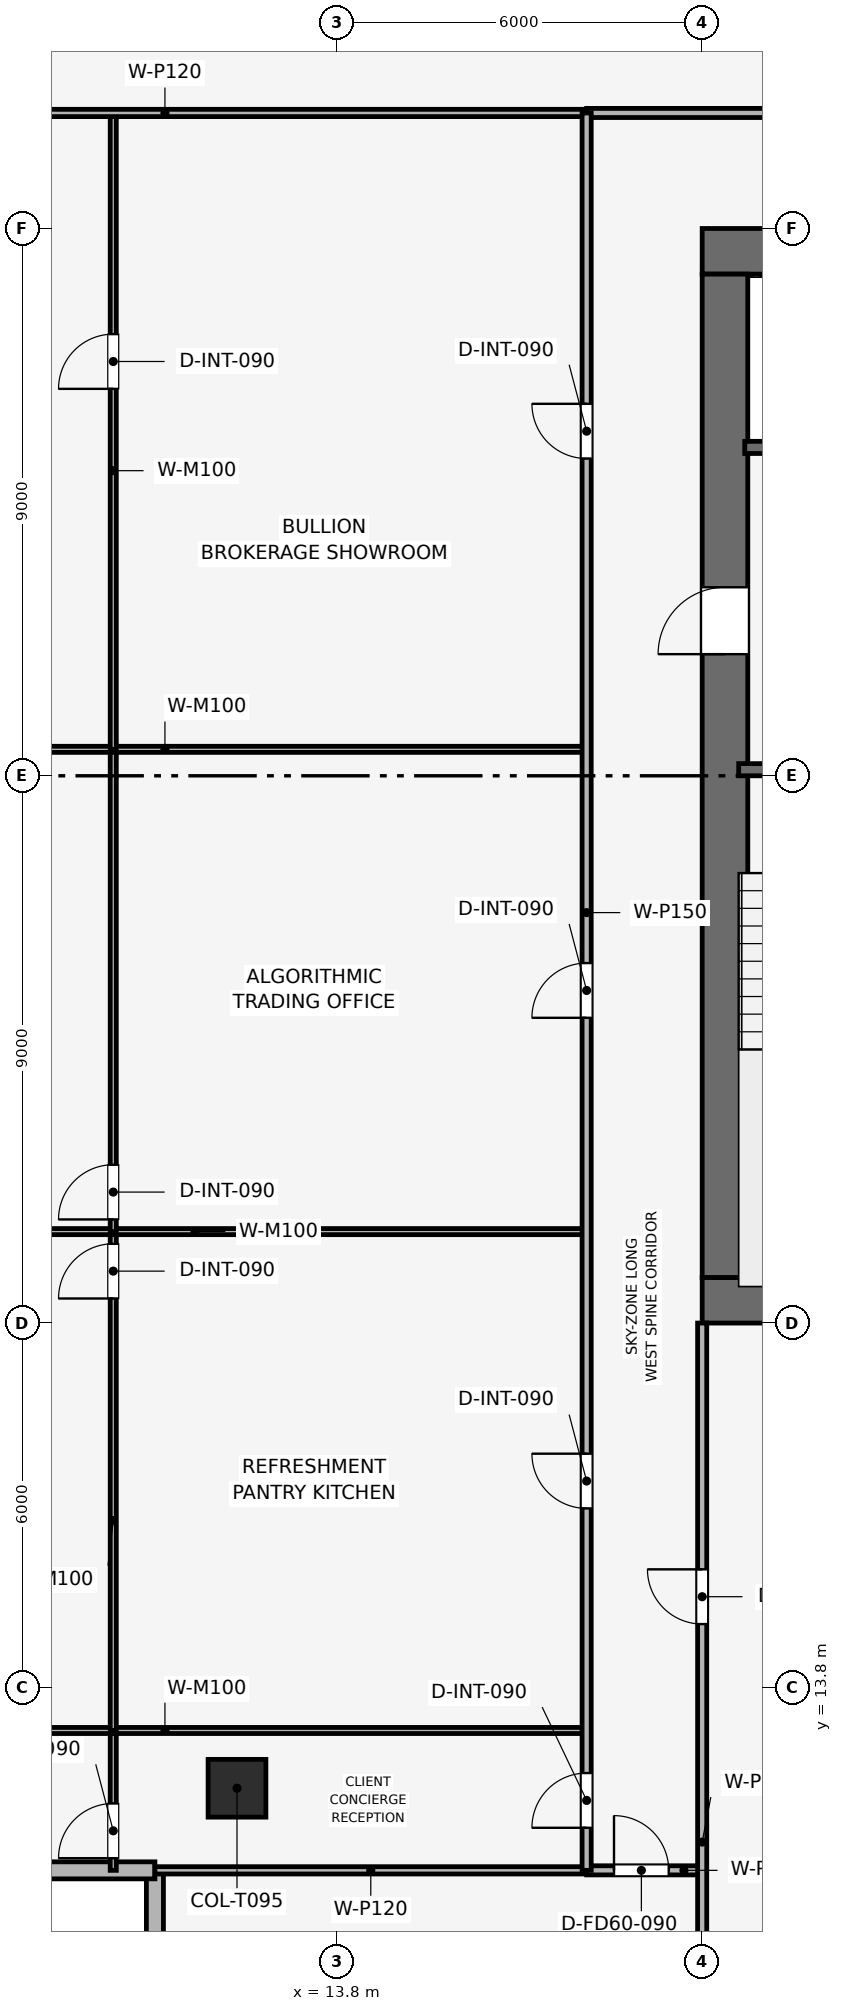
"""IFC4 building model, lengths in metres.
Left out: names, types, materials, properties, quantities, classifications, styles, units other than length and angle.
Written with IfcOpenShell. Run it as: python <this file> out.ifc"""

import sys

from ifc_helpers import new_model, si_unit, direction, frame, frame_2d, origin, origin_2d, place, context, subcontext, project, spatial, rectangle, extrude, element, fill, save


model = new_model("IFC4")
c1 = context("Model", 3, precision=1e-05, world=origin(), true_north=direction((0.0, 1.0)))
c2 = subcontext(c1, "Body", "Model", "MODEL_VIEW")
j1 = project(units=[si_unit("LENGTHUNIT", "METRE"), si_unit("PLANEANGLEUNIT", "RADIAN")], contexts=[c1])
p1 = place(None, origin())
s1 = spatial("IfcSite", under=j1, at=p1, CompositionType="ELEMENT")
p2 = place(p1, origin())
s2 = spatial("IfcBuilding", under=s1, at=p2, CompositionType="ELEMENT")
p3 = place(p2, frame((0.0, 0.0, 272.85)))
s3 = spatial("IfcBuildingStorey", under=s2, at=p3, CompositionType="ELEMENT", Elevation=272.85)
p4 = place(p3, frame((19.8, 20.175, 0.0), z_axis=(0.0, 0.0, 1.0), x_axis=(1.0, 0.0, 0.0)))
e1 = element("IfcWall", 1, at=p4, inside=s3, PredefinedType="SHEAR", context=c2, shape_type="SweptSolid", body=[
    extrude(rectangle(XDim=18.0, YDim=0.75, at=frame_2d((9.0, 0.0))), origin(), (0.0, 0.0, 1.0), 3.75),
])
p5 = place(p3, frame((19.8, 37.425, 0.0), z_axis=(0.0, 0.0, 1.0), x_axis=(1.0, 0.0, 0.0)))
e2 = element("IfcWall", 2, at=p5, inside=s3, PredefinedType="SHEAR", context=c2, shape_type="SweptSolid", body=[
    extrude(rectangle(XDim=18.0, YDim=0.75, at=frame_2d((9.0, 0.0))), origin(), (0.0, 0.0, 1.0), 3.75),
])
p6 = place(p5, frame((7.05, 0.0, 0.0)))
e3 = element("IfcOpeningElement", 3, at=p6, cuts=e2, PredefinedType="OPENING", context=c2, shape_type="SweptSolid", body=[
    extrude(rectangle(XDim=1.1, YDim=2.15, at=frame_2d((0.55, 1.075))), frame((0.0, 0.385, 0.0), z_axis=(0.0, -1.0, 0.0), x_axis=(1.0, 0.0, 0.0)), (0.0, 0.0, 1.0), 0.77),
])
p7 = place(p3, frame((20.175, 20.55, 0.0), z_axis=(0.0, 0.0, 1.0), x_axis=(0.0, 1.0, 0.0)))
e4 = element("IfcWall", 4, at=p7, inside=s3, PredefinedType="SHEAR", context=c2, shape_type="SweptSolid", body=[
    extrude(rectangle(XDim=16.5, YDim=0.75, at=frame_2d((8.25, 0.0))), origin(), (0.0, 0.0, 1.0), 3.75),
])
p8 = place(p7, frame((10.25, 0.0, 0.0)))
e5 = element("IfcOpeningElement", 5, at=p8, cuts=e4, PredefinedType="OPENING", context=c2, shape_type="SweptSolid", body=[
    extrude(rectangle(XDim=1.1, YDim=2.15, at=frame_2d((0.55, 1.075))), frame((0.0, 0.385, 0.0), z_axis=(0.0, -1.0, 0.0), x_axis=(1.0, 0.0, 0.0)), (0.0, 0.0, 1.0), 0.77),
])
p9 = place(p3, frame((12.15, 12.15, 0.003), z_axis=(0.0, 0.0, 1.0), x_axis=(1.0, 0.0, 0.0)))
e6 = element("IfcColumn", 6, at=p9, inside=s3, PredefinedType="COLUMN", context=c2, shape_type="SweptSolid", body=[
    extrude(rectangle(XDim=0.95, YDim=0.95, at=origin_2d()), origin(), (0.0, 0.0, 1.0), 3.494),
])
p10 = place(p3, frame((10.8, 4.03, 0.0), z_axis=(0.0, 0.0, 1.0), x_axis=(0.0, 1.0, 0.0)))
e7 = element("IfcWall", 7, at=p10, inside=s3, PredefinedType="SOLIDWALL", context=c2, shape_type="SweptSolid", body=[
    extrude(rectangle(XDim=6.77, YDim=0.28, at=frame_2d((3.385, 0.0))), origin(), (0.0, 0.0, 1.0), 3.5),
])
p11 = place(p10, frame((2.135, 0.0, 0.9)))
e8 = element("IfcOpeningElement", 8, at=p11, cuts=e7, PredefinedType="OPENING", context=c2, shape_type="SweptSolid", body=[
    extrude(rectangle(XDim=2.5, YDim=1.9, at=frame_2d((1.25, 0.95))), frame((0.0, 0.15, 0.0), z_axis=(0.0, -1.0, 0.0), x_axis=(1.0, 0.0, 0.0)), (0.0, 0.0, 1.0), 0.3),
])
p12 = place(p3, frame((10.8, 10.8, 0.0), z_axis=(0.0, 0.0, 1.0), x_axis=(-1.0, 0.0, 0.0)))
e9 = element("IfcWall", 9, at=p12, inside=s3, PredefinedType="SOLIDWALL", context=c2, shape_type="SweptSolid", body=[
    extrude(rectangle(XDim=6.77, YDim=0.28, at=frame_2d((3.385, 0.0))), origin(), (0.0, 0.0, 1.0), 3.5),
])
p13 = place(p12, frame((2.135, 0.0, 0.9)))
e10 = element("IfcOpeningElement", 10, at=p13, cuts=e9, PredefinedType="OPENING", context=c2, shape_type="SweptSolid", body=[
    extrude(rectangle(XDim=2.5, YDim=1.9, at=frame_2d((1.25, 0.95))), frame((0.0, 0.15, 0.0), z_axis=(0.0, -1.0, 0.0), x_axis=(1.0, 0.0, 0.0)), (0.0, 0.0, 1.0), 0.3),
])
p14 = place(p3, frame((20.4, 28.9, 0.0), z_axis=(0.0, 0.0, 1.0), x_axis=(1.0, 0.0, 0.0)))
e11 = element("IfcWall", 11, at=p14, inside=s3, PredefinedType="SHEAR", context=c2, shape_type="SweptSolid", body=[
    extrude(rectangle(XDim=3.15, YDim=0.2, at=frame_2d((1.575, 0.0))), origin(), (0.0, 0.0, 1.0), 3.5),
])
p15 = place(p14, frame((0.8, 0.0, 0.0)))
e12 = element("IfcOpeningElement", 12, at=p15, cuts=e11, PredefinedType="OPENING", context=c2, shape_type="SweptSolid", body=[
    extrude(rectangle(XDim=1.0, YDim=2.1, at=frame_2d((0.5, 1.05))), frame((0.0, 0.11, 0.0), z_axis=(0.0, -1.0, 0.0), x_axis=(1.0, 0.0, 0.0)), (0.0, 0.0, 1.0), 0.22),
])
p16 = place(p3, frame((20.5, 34.2, 0.0), z_axis=(0.0, 0.0, 1.0), x_axis=(1.0, 0.0, 0.0)))
e13 = element("IfcWall", 13, at=p16, inside=s3, PredefinedType="SHEAR", context=c2, shape_type="SweptSolid", body=[
    extrude(rectangle(XDim=3.05, YDim=0.2, at=frame_2d((1.525, 0.0))), origin(), (0.0, 0.0, 1.0), 3.5),
])
p17 = place(p16, frame((0.75, 0.0, 0.0)))
e14 = element("IfcOpeningElement", 14, at=p17, cuts=e13, PredefinedType="OPENING", context=c2, shape_type="SweptSolid", body=[
    extrude(rectangle(XDim=1.1, YDim=2.15, at=frame_2d((0.55, 1.075))), frame((0.0, 0.11, 0.0), z_axis=(0.0, -1.0, 0.0), x_axis=(1.0, 0.0, 0.0)), (0.0, 0.0, 1.0), 0.22),
])
p18 = place(p3, frame((10.115, 10.8, 0.0), z_axis=(0.0, 0.0, 1.0), x_axis=(0.0, 1.0, 0.0)))
e15 = element("IfcWall", 15, at=p18, inside=s3, PredefinedType="MOVABLE", context=c2, shape_type="SweptSolid", body=[
    extrude(rectangle(XDim=2.3, YDim=0.1, at=frame_2d((1.15, 0.0))), origin(), (0.0, 0.0, 1.0), 3.085),
])
p19 = place(p18, frame((0.2, 0.0, 0.0)))
e16 = element("IfcOpeningElement", 16, at=p19, cuts=e15, PredefinedType="OPENING", context=c2, shape_type="SweptSolid", body=[
    extrude(rectangle(XDim=0.9, YDim=2.1, at=frame_2d((0.45, 1.05))), frame((0.0, 0.06, 0.0), z_axis=(0.0, -1.0, 0.0), x_axis=(1.0, 0.0, 0.0)), (0.0, 0.0, 1.0), 0.12),
])
p20 = place(p3, frame((4.03, 13.1, 0.0), z_axis=(0.0, 0.0, 1.0), x_axis=(1.0, 0.0, 0.0)))
e17 = element("IfcWall", 17, at=p20, inside=s3, PredefinedType="MOVABLE", context=c2, shape_type="SweptSolid", body=[
    extrude(rectangle(XDim=13.87, YDim=0.1, at=frame_2d((6.935, 0.0))), origin(), (0.0, 0.0, 1.0), 3.085),
])
p21 = place(p3, frame((10.115, 13.1, 0.0), z_axis=(0.0, 0.0, 1.0), x_axis=(0.0, 1.0, 0.0)))
e18 = element("IfcWall", 18, at=p21, inside=s3, PredefinedType="MOVABLE", context=c2, shape_type="SweptSolid", body=[
    extrude(rectangle(XDim=8.204, YDim=0.1, at=frame_2d((4.102, 0.0))), origin(), (0.0, 0.0, 1.0), 3.085),
])
p22 = place(p21, frame((7.104, 0.0, 0.0)))
e19 = element("IfcOpeningElement", 19, at=p22, cuts=e18, PredefinedType="OPENING", context=c2, shape_type="SweptSolid", body=[
    extrude(rectangle(XDim=0.9, YDim=2.1, at=frame_2d((0.45, 1.05))), frame((0.0, 0.06, 0.0), z_axis=(0.0, -1.0, 0.0), x_axis=(1.0, 0.0, 0.0)), (0.0, 0.0, 1.0), 0.12),
])
p23 = place(p3, frame((4.03, 21.304, 0.0), z_axis=(0.0, 0.0, 1.0), x_axis=(1.0, 0.0, 0.0)))
e20 = element("IfcWall", 20, at=p23, inside=s3, PredefinedType="MOVABLE", context=c2, shape_type="SweptSolid", body=[
    extrude(rectangle(XDim=13.87, YDim=0.1, at=frame_2d((6.935, 0.0))), origin(), (0.0, 0.0, 1.0), 3.085),
])
p24 = place(p3, frame((10.115, 21.304, 0.0), z_axis=(0.0, 0.0, 1.0), x_axis=(0.0, 1.0, 0.0)))
e21 = element("IfcWall", 21, at=p24, inside=s3, PredefinedType="MOVABLE", context=c2, shape_type="SweptSolid", body=[
    extrude(rectangle(XDim=7.931, YDim=0.1, at=frame_2d((3.966, 0.0))), origin(), (0.0, 0.0, 1.0), 3.085),
])
p25 = place(p24, frame((0.2, 0.0, 0.0)))
e22 = element("IfcOpeningElement", 22, at=p25, cuts=e21, PredefinedType="OPENING", context=c2, shape_type="SweptSolid", body=[
    extrude(rectangle(XDim=0.9, YDim=2.1, at=frame_2d((0.45, 1.05))), frame((0.0, 0.06, 0.0), z_axis=(0.0, -1.0, 0.0), x_axis=(1.0, 0.0, 0.0)), (0.0, 0.0, 1.0), 0.12),
])
p26 = place(p3, frame((4.03, 29.235, 0.0), z_axis=(0.0, 0.0, 1.0), x_axis=(1.0, 0.0, 0.0)))
e23 = element("IfcWall", 23, at=p26, inside=s3, PredefinedType="MOVABLE", context=c2, shape_type="SweptSolid", body=[
    extrude(rectangle(XDim=13.87, YDim=0.1, at=frame_2d((6.935, 0.0))), origin(), (0.0, 0.0, 1.0), 3.085),
])
p27 = place(p3, frame((10.115, 29.235, 0.0), z_axis=(0.0, 0.0, 1.0), x_axis=(0.0, 1.0, 0.0)))
e24 = element("IfcWall", 24, at=p27, inside=s3, PredefinedType="MOVABLE", context=c2, shape_type="SweptSolid", body=[
    extrude(rectangle(XDim=10.465, YDim=0.1, at=frame_2d((5.232, 0.0))), origin(), (0.0, 0.0, 1.0), 3.085),
])
p28 = place(p27, frame((5.928, 0.0, 0.0)))
e25 = element("IfcOpeningElement", 25, at=p28, cuts=e24, PredefinedType="OPENING", context=c2, shape_type="SweptSolid", body=[
    extrude(rectangle(XDim=0.9, YDim=2.1, at=frame_2d((0.45, 1.05))), frame((0.0, 0.06, 0.0), z_axis=(0.0, -1.0, 0.0), x_axis=(1.0, 0.0, 0.0)), (0.0, 0.0, 1.0), 0.12),
])
p29 = place(p3, frame((10.8, 10.8, 0.0), z_axis=(0.0, 0.0, 1.0), x_axis=(1.0, 0.0, 0.0)))
e26 = element("IfcWall", 26, at=p29, inside=s3, PredefinedType="PARTITIONING", context=c2, shape_type="SweptSolid", body=[
    extrude(rectangle(XDim=7.1, YDim=0.12, at=frame_2d((3.55, 0.0))), origin(), (0.0, 0.0, 1.0), 3.085),
])
p30 = place(p3, frame((17.9, 10.8, 0.0), z_axis=(0.0, 0.0, 1.0), x_axis=(1.0, 0.0, 0.0)))
e27 = element("IfcWall", 27, at=p30, inside=s3, PredefinedType="PARTITIONING", context=c2, shape_type="SweptSolid", body=[
    extrude(rectangle(XDim=1.9, YDim=0.15, at=frame_2d((0.95, 0.0))), origin(), (0.0, 0.0, 1.0), 3.5),
])
p31 = place(p30, frame((0.45, 0.0, 0.0)))
e28 = element("IfcOpeningElement", 28, at=p31, cuts=e27, PredefinedType="OPENING", context=c2, shape_type="SweptSolid", body=[
    extrude(rectangle(XDim=0.9, YDim=2.1, at=frame_2d((0.45, 1.05))), frame((0.0, 0.085, 0.0), z_axis=(0.0, -1.0, 0.0), x_axis=(1.0, 0.0, 0.0)), (0.0, 0.0, 1.0), 0.17),
])
p32 = place(p3, frame((19.8, 4.03, 0.0), z_axis=(0.0, 0.0, 1.0), x_axis=(0.0, 1.0, 0.0)))
e29 = element("IfcWall", 29, at=p32, inside=s3, PredefinedType="PARTITIONING", context=c2, shape_type="SweptSolid", body=[
    extrude(rectangle(XDim=15.77, YDim=0.15, at=frame_2d((7.885, 0.0))), origin(), (0.0, 0.0, 1.0), 3.085),
])
p33 = place(p32, frame((10.82, 0.0, 0.0)))
e30 = element("IfcOpeningElement", 30, at=p33, cuts=e29, PredefinedType="OPENING", context=c2, shape_type="SweptSolid", body=[
    extrude(rectangle(XDim=0.9, YDim=2.1, at=frame_2d((0.45, 1.05))), frame((0.0, 0.085, 0.0), z_axis=(0.0, -1.0, 0.0), x_axis=(1.0, 0.0, 0.0)), (0.0, 0.0, 1.0), 0.17),
])
p34 = place(p3, frame((4.03, 39.7, 0.0), z_axis=(0.0, 0.0, 1.0), x_axis=(1.0, 0.0, 0.0)))
e31 = element("IfcWall", 31, at=p34, inside=s3, PredefinedType="PARTITIONING", context=c2, shape_type="SweptSolid", body=[
    extrude(rectangle(XDim=13.87, YDim=0.12, at=frame_2d((6.935, 0.0))), origin(), (0.0, 0.0, 1.0), 3.085),
])
p35 = place(p3, frame((17.9, 39.7, 0.0), z_axis=(0.0, 0.0, 1.0), x_axis=(1.0, 0.0, 0.0)))
e32 = element("IfcWall", 32, at=p35, inside=s3, PredefinedType="PARTITIONING", context=c2, shape_type="SweptSolid", body=[
    extrude(rectangle(XDim=21.8, YDim=0.15, at=frame_2d((10.9, 0.0))), origin(), (0.0, 0.0, 1.0), 3.085),
])
p36 = place(p35, frame((3.3, 0.0, 0.0)))
e33 = element("IfcOpeningElement", 33, at=p36, cuts=e32, PredefinedType="OPENING", context=c2, shape_type="SweptSolid", body=[
    extrude(rectangle(XDim=0.9, YDim=2.1, at=frame_2d((0.45, 1.05))), frame((0.0, 0.085, 0.0), z_axis=(0.0, -1.0, 0.0), x_axis=(1.0, 0.0, 0.0)), (0.0, 0.0, 1.0), 0.17),
])
p37 = place(p35, frame((8.45, 0.0, 0.0)))
e34 = element("IfcOpeningElement", 34, at=p37, cuts=e32, PredefinedType="OPENING", context=c2, shape_type="SweptSolid", body=[
    extrude(rectangle(XDim=0.9, YDim=2.1, at=frame_2d((0.45, 1.05))), frame((0.0, 0.085, 0.0), z_axis=(0.0, -1.0, 0.0), x_axis=(1.0, 0.0, 0.0)), (0.0, 0.0, 1.0), 0.17),
])
p38 = place(p35, frame((11.35, 0.0, 0.0)))
e35 = element("IfcOpeningElement", 35, at=p38, cuts=e32, PredefinedType="OPENING", context=c2, shape_type="SweptSolid", body=[
    extrude(rectangle(XDim=0.9, YDim=2.1, at=frame_2d((0.45, 1.05))), frame((0.0, 0.085, 0.0), z_axis=(0.0, -1.0, 0.0), x_axis=(1.0, 0.0, 0.0)), (0.0, 0.0, 1.0), 0.17),
])
p39 = place(p35, frame((14.1, 0.0, 0.0)))
e36 = element("IfcOpeningElement", 36, at=p39, cuts=e32, PredefinedType="OPENING", context=c2, shape_type="SweptSolid", body=[
    extrude(rectangle(XDim=0.95, YDim=2.1, at=frame_2d((0.475, 1.05))), frame((0.0, 0.085, 0.0), z_axis=(0.0, -1.0, 0.0), x_axis=(1.0, 0.0, 0.0)), (0.0, 0.0, 1.0), 0.17),
])
p40 = place(p35, frame((18.4, 0.0, 0.0)))
e37 = element("IfcOpeningElement", 37, at=p40, cuts=e32, PredefinedType="OPENING", context=c2, shape_type="SweptSolid", body=[
    extrude(rectangle(XDim=0.9, YDim=2.1, at=frame_2d((0.45, 1.05))), frame((0.0, 0.085, 0.0), z_axis=(0.0, -1.0, 0.0), x_axis=(1.0, 0.0, 0.0)), (0.0, 0.0, 1.0), 0.17),
])
p41 = place(p3, frame((17.9, 10.8, 0.0), z_axis=(0.0, 0.0, 1.0), x_axis=(0.0, 1.0, 0.0)))
e38 = element("IfcWall", 38, at=p41, inside=s3, PredefinedType="PARTITIONING", context=c2, shape_type="SweptSolid", body=[
    extrude(rectangle(XDim=28.9, YDim=0.15, at=frame_2d((14.45, 0.0))), origin(), (0.0, 0.0, 1.0), 3.085),
])
p42 = place(p41, frame((0.7, 0.0, 0.0)))
e39 = element("IfcOpeningElement", 39, at=p42, cuts=e38, PredefinedType="OPENING", context=c2, shape_type="SweptSolid", body=[
    extrude(rectangle(XDim=0.9, YDim=2.1, at=frame_2d((0.45, 1.05))), frame((0.0, 0.085, 0.0), z_axis=(0.0, -1.0, 0.0), x_axis=(1.0, 0.0, 0.0)), (0.0, 0.0, 1.0), 0.17),
])
p43 = place(p41, frame((5.952, 0.0, 0.0)))
e40 = element("IfcOpeningElement", 40, at=p43, cuts=e38, PredefinedType="OPENING", context=c2, shape_type="SweptSolid", body=[
    extrude(rectangle(XDim=0.9, YDim=2.1, at=frame_2d((0.45, 1.05))), frame((0.0, 0.085, 0.0), z_axis=(0.0, -1.0, 0.0), x_axis=(1.0, 0.0, 0.0)), (0.0, 0.0, 1.0), 0.17),
])
p44 = place(p41, frame((14.02, 0.0, 0.0)))
e41 = element("IfcOpeningElement", 41, at=p44, cuts=e38, PredefinedType="OPENING", context=c2, shape_type="SweptSolid", body=[
    extrude(rectangle(XDim=0.9, YDim=2.1, at=frame_2d((0.45, 1.05))), frame((0.0, 0.085, 0.0), z_axis=(0.0, -1.0, 0.0), x_axis=(1.0, 0.0, 0.0)), (0.0, 0.0, 1.0), 0.17),
])
p45 = place(p41, frame((23.217, 0.0, 0.0)))
e42 = element("IfcOpeningElement", 42, at=p45, cuts=e38, PredefinedType="OPENING", context=c2, shape_type="SweptSolid", body=[
    extrude(rectangle(XDim=0.9, YDim=2.1, at=frame_2d((0.45, 1.05))), frame((0.0, 0.085, 0.0), z_axis=(0.0, -1.0, 0.0), x_axis=(1.0, 0.0, 0.0)), (0.0, 0.0, 1.0), 0.17),
])
p46 = place(p19, origin())
e43 = element("IfcDoor", 43, at=p46, inside=s3, OperationType="SINGLE_SWING_LEFT", PredefinedType="DOOR", context=c2, shape_type="SweptSolid", body=[
    extrude(rectangle(XDim=0.9, YDim=2.1, at=frame_2d((0.45, 1.05))), frame((0.0, 0.025, 0.0), z_axis=(0.0, -1.0, 0.0), x_axis=(1.0, 0.0, 0.0)), (0.0, 0.0, 1.0), 0.05),
])
fill(e16, e43)
p47 = place(p22, origin())
e44 = element("IfcDoor", 44, at=p47, inside=s3, OperationType="SINGLE_SWING_LEFT", PredefinedType="DOOR", context=c2, shape_type="SweptSolid", body=[
    extrude(rectangle(XDim=0.9, YDim=2.1, at=frame_2d((0.45, 1.05))), frame((0.0, 0.025, 0.0), z_axis=(0.0, -1.0, 0.0), x_axis=(1.0, 0.0, 0.0)), (0.0, 0.0, 1.0), 0.05),
])
fill(e19, e44)
p48 = place(p25, origin())
e45 = element("IfcDoor", 45, at=p48, inside=s3, OperationType="SINGLE_SWING_LEFT", PredefinedType="DOOR", context=c2, shape_type="SweptSolid", body=[
    extrude(rectangle(XDim=0.9, YDim=2.1, at=frame_2d((0.45, 1.05))), frame((0.0, 0.025, 0.0), z_axis=(0.0, -1.0, 0.0), x_axis=(1.0, 0.0, 0.0)), (0.0, 0.0, 1.0), 0.05),
])
fill(e22, e45)
p49 = place(p28, origin())
e46 = element("IfcDoor", 46, at=p49, inside=s3, OperationType="SINGLE_SWING_LEFT", PredefinedType="DOOR", context=c2, shape_type="SweptSolid", body=[
    extrude(rectangle(XDim=0.9, YDim=2.1, at=frame_2d((0.45, 1.05))), frame((0.0, 0.025, 0.0), z_axis=(0.0, -1.0, 0.0), x_axis=(1.0, 0.0, 0.0)), (0.0, 0.0, 1.0), 0.05),
])
fill(e25, e46)
p50 = place(p31, origin())
e47 = element("IfcDoor", 47, at=p50, inside=s3, OperationType="SINGLE_SWING_LEFT", PredefinedType="DOOR", context=c2, shape_type="SweptSolid", body=[
    extrude(rectangle(XDim=0.9, YDim=2.1, at=frame_2d((0.45, 1.05))), frame((0.0, 0.025, 0.0), z_axis=(0.0, -1.0, 0.0), x_axis=(1.0, 0.0, 0.0)), (0.0, 0.0, 1.0), 0.05),
])
fill(e28, e47)
p51 = place(p33, origin())
e48 = element("IfcDoor", 48, at=p51, inside=s3, OperationType="SINGLE_SWING_RIGHT", PredefinedType="DOOR", context=c2, shape_type="SweptSolid", body=[
    extrude(rectangle(XDim=0.9, YDim=2.1, at=frame_2d((0.45, 1.05))), frame((0.0, 0.025, 0.0), z_axis=(0.0, -1.0, 0.0), x_axis=(1.0, 0.0, 0.0)), (0.0, 0.0, 1.0), 0.05),
])
fill(e30, e48)
p52 = place(p42, origin())
e49 = element("IfcDoor", 49, at=p52, inside=s3, OperationType="SINGLE_SWING_LEFT", PredefinedType="DOOR", context=c2, shape_type="SweptSolid", body=[
    extrude(rectangle(XDim=0.9, YDim=2.1, at=frame_2d((0.45, 1.05))), frame((0.0, 0.025, 0.0), z_axis=(0.0, -1.0, 0.0), x_axis=(1.0, 0.0, 0.0)), (0.0, 0.0, 1.0), 0.05),
])
fill(e39, e49)
p53 = place(p43, origin())
e50 = element("IfcDoor", 50, at=p53, inside=s3, OperationType="SINGLE_SWING_RIGHT", PredefinedType="DOOR", context=c2, shape_type="SweptSolid", body=[
    extrude(rectangle(XDim=0.9, YDim=2.1, at=frame_2d((0.45, 1.05))), frame((0.0, 0.025, 0.0), z_axis=(0.0, -1.0, 0.0), x_axis=(1.0, 0.0, 0.0)), (0.0, 0.0, 1.0), 0.05),
])
fill(e40, e50)
p54 = place(p44, origin())
e51 = element("IfcDoor", 51, at=p54, inside=s3, OperationType="SINGLE_SWING_LEFT", PredefinedType="DOOR", context=c2, shape_type="SweptSolid", body=[
    extrude(rectangle(XDim=0.9, YDim=2.1, at=frame_2d((0.45, 1.05))), frame((0.0, 0.025, 0.0), z_axis=(0.0, -1.0, 0.0), x_axis=(1.0, 0.0, 0.0)), (0.0, 0.0, 1.0), 0.05),
])
fill(e41, e51)
p55 = place(p45, origin())
e52 = element("IfcDoor", 52, at=p55, inside=s3, OperationType="SINGLE_SWING_RIGHT", PredefinedType="DOOR", context=c2, shape_type="SweptSolid", body=[
    extrude(rectangle(XDim=0.9, YDim=2.1, at=frame_2d((0.45, 1.05))), frame((0.0, 0.025, 0.0), z_axis=(0.0, -1.0, 0.0), x_axis=(1.0, 0.0, 0.0)), (0.0, 0.0, 1.0), 0.05),
])
fill(e42, e52)
p56 = place(p8, origin())
e53 = element("IfcDoor", 53, at=p56, inside=s3, OperationType="SINGLE_SWING_LEFT", PredefinedType="DOOR", context=c2, shape_type="SweptSolid", body=[
    extrude(rectangle(XDim=1.1, YDim=2.15, at=frame_2d((0.55, 1.075))), frame((0.0, 0.025, 0.0), z_axis=(0.0, -1.0, 0.0), x_axis=(1.0, 0.0, 0.0)), (0.0, 0.0, 1.0), 0.05),
])
fill(e5, e53)
save(model, sys.argv[1])
